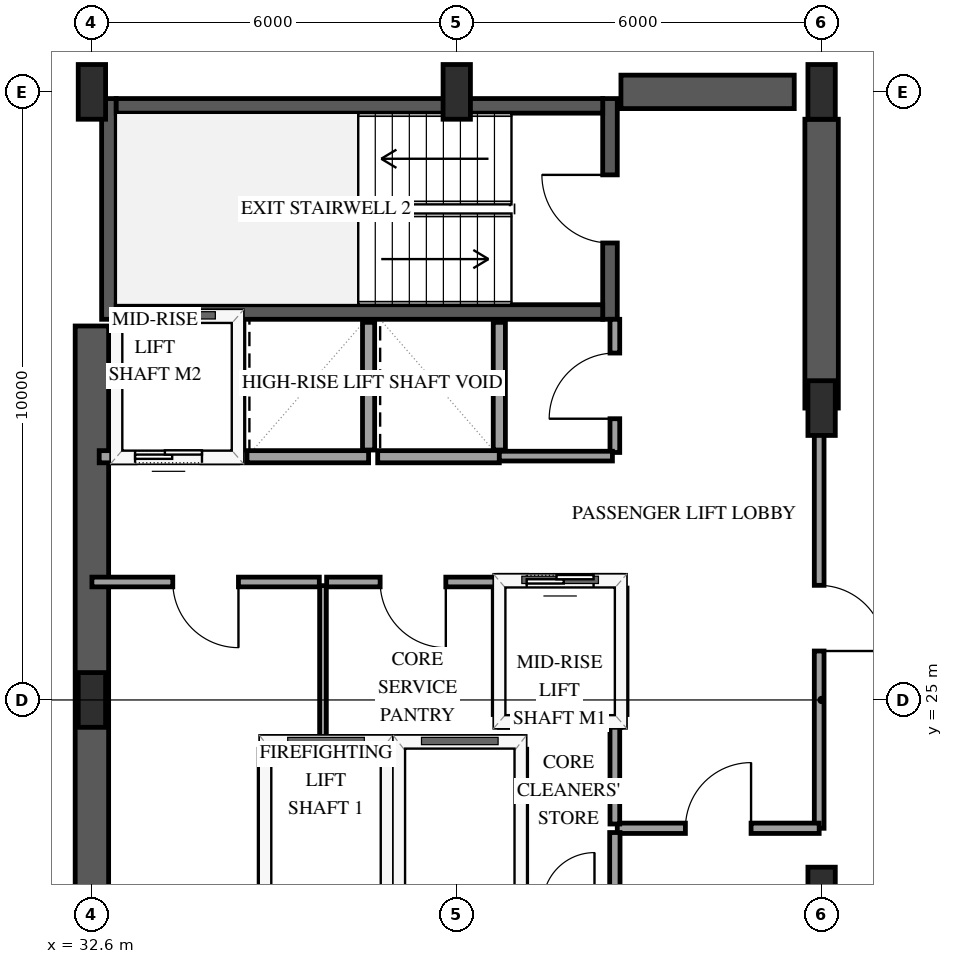
"""IFC4 building model, lengths in metres.
Left out: names, types, materials, properties, quantities, classifications, styles, units other than length and angle.
Written with IfcOpenShell. Run it as: python <this file> out.ifc"""

import sys

from ifc_helpers import new_model, si_unit, direction, frame, frame_2d, origin, origin_2d, place, context, subcontext, project, spatial, rectangle, extrude, element, fill, save


model = new_model("IFC4")
c1 = context("Model", 3, precision=1e-05, world=origin(), true_north=direction((0.0, 1.0)))
c2 = subcontext(c1, "Body", "Model", "MODEL_VIEW")
j1 = project(units=[si_unit("LENGTHUNIT", "METRE"), si_unit("PLANEANGLEUNIT", "RADIAN")], contexts=[c1])
p1 = place(None, origin())
s1 = spatial("IfcSite", under=j1, at=p1, CompositionType="ELEMENT")
p2 = place(p1, origin())
s2 = spatial("IfcBuilding", under=s1, at=p2, CompositionType="ELEMENT")
p3 = place(p2, frame((0.0, 0.0, 175.0)))
s3 = spatial("IfcBuildingStorey", under=s2, at=p3, CompositionType="ELEMENT", Elevation=175.0)
p4 = place(p3, frame((32.88, 31.26, 0.0), z_axis=(0.0, 0.0, 1.0), x_axis=(0.0, 1.0, 0.0)))
e1 = element("IfcWall", 1, at=p4, inside=s3, PredefinedType="SHEAR", context=c2, shape_type="SweptSolid", body=[
    extrude(rectangle(XDim=3.63, YDim=0.24, at=frame_2d((1.815, 0.0))), origin(), (0.0, 0.0, 1.0), 3.6),
])
p5 = place(p3, frame((41.12, 31.26, 0.0), z_axis=(0.0, 0.0, 1.0), x_axis=(0.0, 1.0, 0.0)))
e2 = element("IfcWall", 2, at=p5, inside=s3, PredefinedType="SHEAR", context=c2, shape_type="SweptSolid", body=[
    extrude(rectangle(XDim=3.63, YDim=0.24, at=frame_2d((1.815, 0.0))), origin(), (0.0, 0.0, 1.0), 3.6),
])
p6 = place(p5, frame((1.255, 0.0, 0.0)))
e3 = element("IfcOpeningElement", 3, at=p6, cuts=e2, PredefinedType="OPENING", context=c2, shape_type="SweptSolid", body=[
    extrude(rectangle(XDim=1.12, YDim=2.15, at=frame_2d((0.56, 1.075))), frame((0.0, 0.13, 0.0), z_axis=(0.0, -1.0, 0.0), x_axis=(1.0, 0.0, 0.0)), (0.0, 0.0, 1.0), 0.26),
])
for number, where, z_axis, x_axis in (
    (4, (33.0, 31.38, 0.0), (0.0, 0.0, 1.0), (1.0, 0.0, 0.0)),
    (5, (33.0, 34.77, 0.0), (0.0, 0.0, 1.0), (1.0, 0.0, 0.0)),
):
    element("IfcWall", number, at=place(p3, frame(where, z_axis=z_axis, x_axis=x_axis)), inside=s3, PredefinedType="SHEAR", context=c2, shape_type="SweptSolid", body=[
        extrude(rectangle(XDim=8.0, YDim=0.24, at=frame_2d((4.0, 0.0))), origin(), (0.0, 0.0, 1.0), 3.6),
    ])
p7 = place(p3, frame((32.6, 18.85, 0.0), z_axis=(0.0, 0.0, 1.0), x_axis=(0.0, 1.0, 0.0)))
e6 = element("IfcWall", 6, at=p7, inside=s3, PredefinedType="SHEAR", context=c2, shape_type="SweptSolid", body=[
    extrude(rectangle(XDim=12.3, YDim=0.55, at=frame_2d((6.15, 0.0))), origin(), (0.0, 0.0, 1.0), 3.6),
])
p8 = place(p3, frame((41.3, 35.0, 0.0), z_axis=(0.0, 0.0, 1.0), x_axis=(1.0, 0.0, 0.0)))
e7 = element("IfcWall", 7, at=p8, inside=s3, PredefinedType="SHEAR", context=c2, shape_type="SweptSolid", body=[
    extrude(rectangle(XDim=2.85, YDim=0.55, at=frame_2d((1.425, 0.0))), origin(), (0.0, 0.0, 1.0), 3.6),
])
p9 = place(p3, frame((44.6, 29.8, 0.0), z_axis=(0.0, 0.0, 1.0), x_axis=(0.0, 1.0, 0.0)))
e8 = element("IfcWall", 8, at=p9, inside=s3, PredefinedType="SHEAR", context=c2, shape_type="SweptSolid", body=[
    extrude(rectangle(XDim=4.75, YDim=0.55, at=frame_2d((2.375, 0.0))), origin(), (0.0, 0.0, 1.0), 3.6),
])
for number, where, z_axis, x_axis in (
    (9, (32.6, 25.0, 0.0), (0.0, 0.0, 1.0), (1.0, 0.0, 0.0)),
    (10, (32.6, 35.0, 0.0), (0.0, 0.0, 1.0), (1.0, 0.0, 0.0)),
    (11, (38.6, 35.0, 0.0), (0.0, 0.0, 1.0), (1.0, 0.0, 0.0)),
    (12, (44.6, 21.8, 0.0), (0.0, 0.0, 1.0), (1.0, 0.0, 0.0)),
    (13, (44.6, 29.8, 0.0), (0.0, 0.0, 1.0), (1.0, 0.0, 0.0)),
    (14, (44.6, 35.0, 0.0), (0.0, 0.0, 1.0), (1.0, 0.0, 0.0)),
):
    element("IfcColumn", number, at=place(p3, frame(where, z_axis=z_axis, x_axis=x_axis)), inside=s3, PredefinedType="PILASTER", context=c2, shape_type="SweptSolid", body=[
        extrude(rectangle(XDim=0.45, YDim=0.9, at=origin_2d()), origin(), (0.0, 0.0, 1.0), 3.6),
    ])
p10 = place(p3, frame((35.45, 24.3, 0.0), z_axis=(0.0, 0.0, 1.0), x_axis=(1.0, 0.0, 0.0)))
e15 = element("IfcWall", 15, at=p10, inside=s3, PredefinedType="SOLIDWALL", context=c2, shape_type="SweptSolid", body=[
    extrude(rectangle(XDim=2.0, YDim=0.2, at=frame_2d((1.0, 0.0))), origin(), (0.0, 0.0, 1.0), 3.3),
])
for number, where, z_axis, x_axis in (
    (16, (35.45, 21.81, 0.0), (0.0, 0.0, 1.0), (0.0, 1.0, 0.0)),
    (17, (37.45, 21.81, 0.0), (0.0, 0.0, 1.0), (0.0, 1.0, 0.0)),
):
    element("IfcWall", number, at=place(p3, frame(where, z_axis=z_axis, x_axis=x_axis)), inside=s3, PredefinedType="SOLIDWALL", context=c2, shape_type="SweptSolid", body=[
        extrude(rectangle(XDim=2.38, YDim=0.2, at=frame_2d((1.19, 0.0))), origin(), (0.0, 0.0, 1.0), 3.3),
    ])
p11 = place(p3, frame((37.65, 24.3, 0.0), z_axis=(0.0, 0.0, 1.0), x_axis=(1.0, 0.0, 0.0)))
e18 = element("IfcWall", 18, at=p11, inside=s3, PredefinedType="SOLIDWALL", context=c2, shape_type="SweptSolid", body=[
    extrude(rectangle(XDim=2.0, YDim=0.2, at=frame_2d((1.0, 0.0))), origin(), (0.0, 0.0, 1.0), 3.3),
])
p12 = place(p3, frame((39.65, 21.81, 0.0), z_axis=(0.0, 0.0, 1.0), x_axis=(0.0, 1.0, 0.0)))
e19 = element("IfcWall", 19, at=p12, inside=s3, PredefinedType="SOLIDWALL", context=c2, shape_type="SweptSolid", body=[
    extrude(rectangle(XDim=2.38, YDim=0.2, at=frame_2d((1.19, 0.0))), origin(), (0.0, 0.0, 1.0), 3.3),
])
p13 = place(p3, frame((39.3, 24.65, 0.0), z_axis=(0.0, 0.0, 1.0), x_axis=(1.0, 0.0, 0.0)))
e20 = element("IfcWall", 20, at=p13, inside=s3, PredefinedType="SOLIDWALL", context=c2, shape_type="SweptSolid", body=[
    extrude(rectangle(XDim=2.0, YDim=0.2, at=frame_2d((1.0, 0.0))), origin(), (0.0, 0.0, 1.0), 3.3),
])
p14 = place(p3, frame((39.3, 26.95, 0.0), z_axis=(0.0, 0.0, 1.0), x_axis=(1.0, 0.0, 0.0)))
e21 = element("IfcWall", 21, at=p14, inside=s3, PredefinedType="SOLIDWALL", context=c2, shape_type="SweptSolid", body=[
    extrude(rectangle(XDim=2.0, YDim=0.2, at=frame_2d((1.0, 0.0))), origin(), (0.0, 0.0, 1.0), 3.3),
])
p15 = place(p14, frame((0.45, 0.0, 0.0)))
e22 = element("IfcOpeningElement", 22, at=p15, cuts=e21, PredefinedType="OPENING", context=c2, shape_type="SweptSolid", body=[
    extrude(rectangle(XDim=1.1, YDim=2.15, at=frame_2d((0.55, 1.075))), frame((0.0, 0.11, 0.0), z_axis=(0.0, -1.0, 0.0), x_axis=(1.0, 0.0, 0.0)), (0.0, 0.0, 1.0), 0.22),
])
for number, where, z_axis, x_axis in (
    (23, (39.3, 24.76, 0.0), (0.0, 0.0, 1.0), (0.0, 1.0, 0.0)),
    (24, (41.3, 24.76, 0.0), (0.0, 0.0, 1.0), (0.0, 1.0, 0.0)),
):
    element("IfcWall", number, at=place(p3, frame(where, z_axis=z_axis, x_axis=x_axis)), inside=s3, PredefinedType="SOLIDWALL", context=c2, shape_type="SweptSolid", body=[
        extrude(rectangle(XDim=2.08, YDim=0.2, at=frame_2d((1.04, 0.0))), origin(), (0.0, 0.0, 1.0), 3.3),
    ])
p16 = place(p3, frame((32.72, 29.0, 0.0), z_axis=(0.0, 0.0, 1.0), x_axis=(1.0, 0.0, 0.0)))
e25 = element("IfcWall", 25, at=p16, inside=s3, PredefinedType="SOLIDWALL", context=c2, shape_type="SweptSolid", body=[
    extrude(rectangle(XDim=2.28, YDim=0.2, at=frame_2d((1.14, 0.0))), origin(), (0.0, 0.0, 1.0), 3.3),
])
p17 = place(p16, frame((0.59, 0.0, 0.0)))
e26 = element("IfcOpeningElement", 26, at=p17, cuts=e25, PredefinedType="OPENING", context=c2, shape_type="SweptSolid", body=[
    extrude(rectangle(XDim=1.1, YDim=2.15, at=frame_2d((0.55, 1.075))), frame((0.0, 0.11, 0.0), z_axis=(0.0, -1.0, 0.0), x_axis=(1.0, 0.0, 0.0)), (0.0, 0.0, 1.0), 0.22),
])
p18 = place(p3, frame((35.0, 29.11, 0.0), z_axis=(0.0, 0.0, 1.0), x_axis=(0.0, 1.0, 0.0)))
e27 = element("IfcWall", 27, at=p18, inside=s3, PredefinedType="SOLIDWALL", context=c2, shape_type="SweptSolid", body=[
    extrude(rectangle(XDim=2.1, YDim=0.2, at=frame_2d((1.05, 0.0))), origin(), (0.0, 0.0, 1.0), 3.3),
])
p19 = place(p3, frame((35.15, 29.0, 0.0), z_axis=(0.0, 0.0, 1.0), x_axis=(1.0, 0.0, 0.0)))
e28 = element("IfcWall", 28, at=p19, inside=s3, PredefinedType="SOLIDWALL", context=c2, shape_type="SweptSolid", body=[
    extrude(rectangle(XDim=2.0, YDim=0.2, at=frame_2d((1.0, 0.0))), origin(), (0.0, 0.0, 1.0), 3.3),
])
p20 = place(p3, frame((37.15, 29.11, 0.0), z_axis=(0.0, 0.0, 1.0), x_axis=(0.0, 1.0, 0.0)))
e29 = element("IfcWall", 29, at=p20, inside=s3, PredefinedType="SOLIDWALL", context=c2, shape_type="SweptSolid", body=[
    extrude(rectangle(XDim=2.1, YDim=0.2, at=frame_2d((1.05, 0.0))), origin(), (0.0, 0.0, 1.0), 3.3),
])
p21 = place(p3, frame((37.3, 29.0, 0.0), z_axis=(0.0, 0.0, 1.0), x_axis=(1.0, 0.0, 0.0)))
e30 = element("IfcWall", 30, at=p21, inside=s3, PredefinedType="SOLIDWALL", context=c2, shape_type="SweptSolid", body=[
    extrude(rectangle(XDim=2.0, YDim=0.2, at=frame_2d((1.0, 0.0))), origin(), (0.0, 0.0, 1.0), 3.3),
])
p22 = place(p3, frame((39.3, 29.11, 0.0), z_axis=(0.0, 0.0, 1.0), x_axis=(0.0, 1.0, 0.0)))
e31 = element("IfcWall", 31, at=p22, inside=s3, PredefinedType="SOLIDWALL", context=c2, shape_type="SweptSolid", body=[
    extrude(rectangle(XDim=2.1, YDim=0.2, at=frame_2d((1.05, 0.0))), origin(), (0.0, 0.0, 1.0), 3.3),
])
p23 = place(p3, frame((44.56, 29.8, 0.0), z_axis=(0.0, 0.0, 1.0), x_axis=(0.0, -1.0, 0.0)))
e32 = element("IfcWall", 32, at=p23, inside=s3, PredefinedType="PARTITIONING", context=c2, shape_type="SweptSolid", body=[
    extrude(rectangle(XDim=6.91, YDim=0.16, at=frame_2d((3.455, 0.0))), origin(), (0.0, 0.0, 1.0), 2.34),
])
p24 = place(p23, frame((2.915, 0.0, 0.0)))
e33 = element("IfcOpeningElement", 33, at=p24, cuts=e32, PredefinedType="OPENING", context=c2, shape_type="SweptSolid", body=[
    extrude(rectangle(XDim=1.08, YDim=2.15, at=frame_2d((0.54, 1.075))), frame((0.0, 0.09, 0.0), z_axis=(0.0, -1.0, 0.0), x_axis=(1.0, 0.0, 0.0)), (0.0, 0.0, 1.0), 0.18),
])
p25 = place(p3, frame((36.34, 26.94, 0.0), z_axis=(0.0, 0.0, 1.0), x_axis=(-1.0, 0.0, 0.0)))
e34 = element("IfcWall", 34, at=p25, inside=s3, PredefinedType="PARTITIONING", context=c2, shape_type="SweptSolid", body=[
    extrude(rectangle(XDim=3.74, YDim=0.16, at=frame_2d((1.87, 0.0))), origin(), (0.0, 0.0, 1.0), 3.3),
])
p26 = place(p25, frame((1.33, 0.0, 0.0)))
e35 = element("IfcOpeningElement", 35, at=p26, cuts=e34, PredefinedType="OPENING", context=c2, shape_type="SweptSolid", body=[
    extrude(rectangle(XDim=1.08, YDim=2.15, at=frame_2d((0.54, 1.075))), frame((0.0, 0.09, 0.0), z_axis=(0.0, -1.0, 0.0), x_axis=(1.0, 0.0, 0.0)), (0.0, 0.0, 1.0), 0.18),
])
p27 = place(p3, frame((41.24, 22.89, 0.0), z_axis=(0.0, 0.0, 1.0), x_axis=(1.0, 0.0, 0.0)))
e36 = element("IfcWall", 36, at=p27, inside=s3, PredefinedType="PARTITIONING", context=c2, shape_type="SweptSolid", body=[
    extrude(rectangle(XDim=3.32, YDim=0.17, at=frame_2d((1.66, 0.0))), origin(), (0.0, 0.0, 1.0), 3.3),
])
p28 = place(p27, frame((1.12, 0.0, 0.0)))
e37 = element("IfcOpeningElement", 37, at=p28, cuts=e36, PredefinedType="OPENING", context=c2, shape_type="SweptSolid", body=[
    extrude(rectangle(XDim=1.08, YDim=2.15, at=frame_2d((0.54, 1.075))), frame((0.0, 0.095, 0.0), z_axis=(0.0, -1.0, 0.0), x_axis=(1.0, 0.0, 0.0)), (0.0, 0.0, 1.0), 0.19),
])
p29 = place(p3, frame((39.3, 26.94, 0.0), z_axis=(0.0, 0.0, 1.0), x_axis=(-1.0, 0.0, 0.0)))
e38 = element("IfcWall", 38, at=p29, inside=s3, PredefinedType="PARTITIONING", context=c2, shape_type="SweptSolid", body=[
    extrude(rectangle(XDim=2.84, YDim=0.16, at=frame_2d((1.42, 0.0))), origin(), (0.0, 0.0, 1.0), 3.3),
])
p30 = place(p29, frame((0.88, 0.0, 0.0)))
e39 = element("IfcOpeningElement", 39, at=p30, cuts=e38, PredefinedType="OPENING", context=c2, shape_type="SweptSolid", body=[
    extrude(rectangle(XDim=1.08, YDim=2.15, at=frame_2d((0.54, 1.075))), frame((0.0, 0.09, 0.0), z_axis=(0.0, -1.0, 0.0), x_axis=(1.0, 0.0, 0.0)), (0.0, 0.0, 1.0), 0.18),
])
p31 = place(p3, frame((36.4, 26.88, 0.0), z_axis=(0.0, 0.0, 1.0), x_axis=(0.0, -1.0, 0.0)))
e40 = element("IfcWall", 40, at=p31, inside=s3, PredefinedType="PARTITIONING", context=c2, shape_type="SweptSolid", body=[
    extrude(rectangle(XDim=2.58, YDim=0.11, at=frame_2d((1.29, 0.0))), origin(), (0.0, 0.0, 1.0), 3.3),
])
p32 = place(p3, frame((41.2, 29.07, 0.0), z_axis=(0.0, 0.0, 1.0), x_axis=(0.0, 1.0, 0.0)))
e41 = element("IfcWall", 41, at=p32, inside=s3, PredefinedType="PARTITIONING", context=c2, shape_type="SweptSolid", body=[
    extrude(rectangle(XDim=2.19, YDim=0.16, at=frame_2d((1.095, 0.0))), origin(), (0.0, 0.0, 1.0), 3.3),
])
p33 = place(p32, frame((0.555, 0.0, 0.0)))
e42 = element("IfcOpeningElement", 42, at=p33, cuts=e41, PredefinedType="OPENING", context=c2, shape_type="SweptSolid", body=[
    extrude(rectangle(XDim=1.08, YDim=2.15, at=frame_2d((0.54, 1.075))), frame((0.0, 0.09, 0.0), z_axis=(0.0, -1.0, 0.0), x_axis=(1.0, 0.0, 0.0)), (0.0, 0.0, 1.0), 0.18),
])
p34 = place(p3, frame((39.3, 29.01, 0.0), z_axis=(0.0, 0.0, 1.0), x_axis=(1.0, 0.0, 0.0)))
e43 = element("IfcWall", 43, at=p34, inside=s3, PredefinedType="PARTITIONING", context=c2, shape_type="SweptSolid", body=[
    extrude(rectangle(XDim=1.86, YDim=0.16, at=frame_2d((0.93, 0.0))), origin(), (0.0, 0.0, 1.0), 3.3),
])
p35 = place(p3, frame((41.2, 22.96, 0.0), z_axis=(0.0, 0.0, 1.0), x_axis=(0.0, 1.0, 0.0)))
e44 = element("IfcWall", 44, at=p35, inside=s3, PredefinedType="PARTITIONING", context=c2, shape_type="SweptSolid", body=[
    extrude(rectangle(XDim=1.69, YDim=0.16, at=frame_2d((0.845, 0.0))), origin(), (0.0, 0.0, 1.0), 3.3),
])
p36 = place(p3, frame((41.2, 21.7, 0.0), z_axis=(0.0, 0.0, 1.0), x_axis=(0.0, 1.0, 0.0)))
e45 = element("IfcWall", 45, at=p36, inside=s3, PredefinedType="PARTITIONING", context=c2, shape_type="SweptSolid", body=[
    extrude(rectangle(XDim=1.12, YDim=0.17, at=frame_2d((0.56, 0.0))), origin(), (0.0, 0.0, 1.0), 3.3),
])
p37 = place(p15, origin())
e46 = element("IfcDoor", 46, at=p37, inside=s3, OperationType="SLIDING_TO_LEFT", PredefinedType="DOOR", context=c2, shape_type="SweptSolid", body=[
    extrude(rectangle(XDim=1.1, YDim=2.15, at=frame_2d((0.55, 1.075))), frame((0.0, 0.025, 0.0), z_axis=(0.0, -1.0, 0.0), x_axis=(1.0, 0.0, 0.0)), (0.0, 0.0, 1.0), 0.05),
])
fill(e22, e46)
p38 = place(p17, origin())
e47 = element("IfcDoor", 47, at=p38, inside=s3, OperationType="SLIDING_TO_LEFT", PredefinedType="DOOR", context=c2, shape_type="SweptSolid", body=[
    extrude(rectangle(XDim=1.1, YDim=2.15, at=frame_2d((0.55, 1.075))), frame((0.0, 0.025, 0.0), z_axis=(0.0, -1.0, 0.0), x_axis=(1.0, 0.0, 0.0)), (0.0, 0.0, 1.0), 0.05),
])
fill(e26, e47)
p39 = place(p6, origin())
e48 = element("IfcDoor", 48, at=p39, inside=s3, OperationType="SINGLE_SWING_RIGHT", PredefinedType="DOOR", context=c2, shape_type="SweptSolid", body=[
    extrude(rectangle(XDim=1.12, YDim=2.15, at=frame_2d((0.56, 1.075))), frame((0.0, 0.025, 0.0), z_axis=(0.0, -1.0, 0.0), x_axis=(1.0, 0.0, 0.0)), (0.0, 0.0, 1.0), 0.05),
])
fill(e3, e48)
p40 = place(p24, origin())
e49 = element("IfcDoor", 49, at=p40, inside=s3, OperationType="SINGLE_SWING_RIGHT", PredefinedType="DOOR", context=c2, shape_type="SweptSolid", body=[
    extrude(rectangle(XDim=1.08, YDim=2.15, at=frame_2d((0.54, 1.075))), frame((0.0, 0.025, 0.0), z_axis=(0.0, -1.0, 0.0), x_axis=(1.0, 0.0, 0.0)), (0.0, 0.0, 1.0), 0.05),
])
fill(e33, e49)
p41 = place(p26, origin())
e50 = element("IfcDoor", 50, at=p41, inside=s3, OperationType="SINGLE_SWING_LEFT", PredefinedType="DOOR", context=c2, shape_type="SweptSolid", body=[
    extrude(rectangle(XDim=1.08, YDim=2.15, at=frame_2d((0.54, 1.075))), frame((0.0, 0.025, 0.0), z_axis=(0.0, -1.0, 0.0), x_axis=(1.0, 0.0, 0.0)), (0.0, 0.0, 1.0), 0.05),
])
fill(e35, e50)
p42 = place(p28, origin())
e51 = element("IfcDoor", 51, at=p42, inside=s3, OperationType="SINGLE_SWING_RIGHT", PredefinedType="DOOR", context=c2, shape_type="SweptSolid", body=[
    extrude(rectangle(XDim=1.08, YDim=2.15, at=frame_2d((0.54, 1.075))), frame((0.0, 0.025, 0.0), z_axis=(0.0, -1.0, 0.0), x_axis=(1.0, 0.0, 0.0)), (0.0, 0.0, 1.0), 0.05),
])
fill(e37, e51)
p43 = place(p30, origin())
e52 = element("IfcDoor", 52, at=p43, inside=s3, OperationType="SINGLE_SWING_LEFT", PredefinedType="DOOR", context=c2, shape_type="SweptSolid", body=[
    extrude(rectangle(XDim=1.08, YDim=2.15, at=frame_2d((0.54, 1.075))), frame((0.0, 0.025, 0.0), z_axis=(0.0, -1.0, 0.0), x_axis=(1.0, 0.0, 0.0)), (0.0, 0.0, 1.0), 0.05),
])
fill(e39, e52)
p44 = place(p33, origin())
e53 = element("IfcDoor", 53, at=p44, inside=s3, OperationType="SINGLE_SWING_LEFT", PredefinedType="DOOR", context=c2, shape_type="SweptSolid", body=[
    extrude(rectangle(XDim=1.08, YDim=2.15, at=frame_2d((0.54, 1.075))), frame((0.0, 0.025, 0.0), z_axis=(0.0, -1.0, 0.0), x_axis=(1.0, 0.0, 0.0)), (0.0, 0.0, 1.0), 0.05),
])
fill(e42, e53)
save(model, sys.argv[1])
